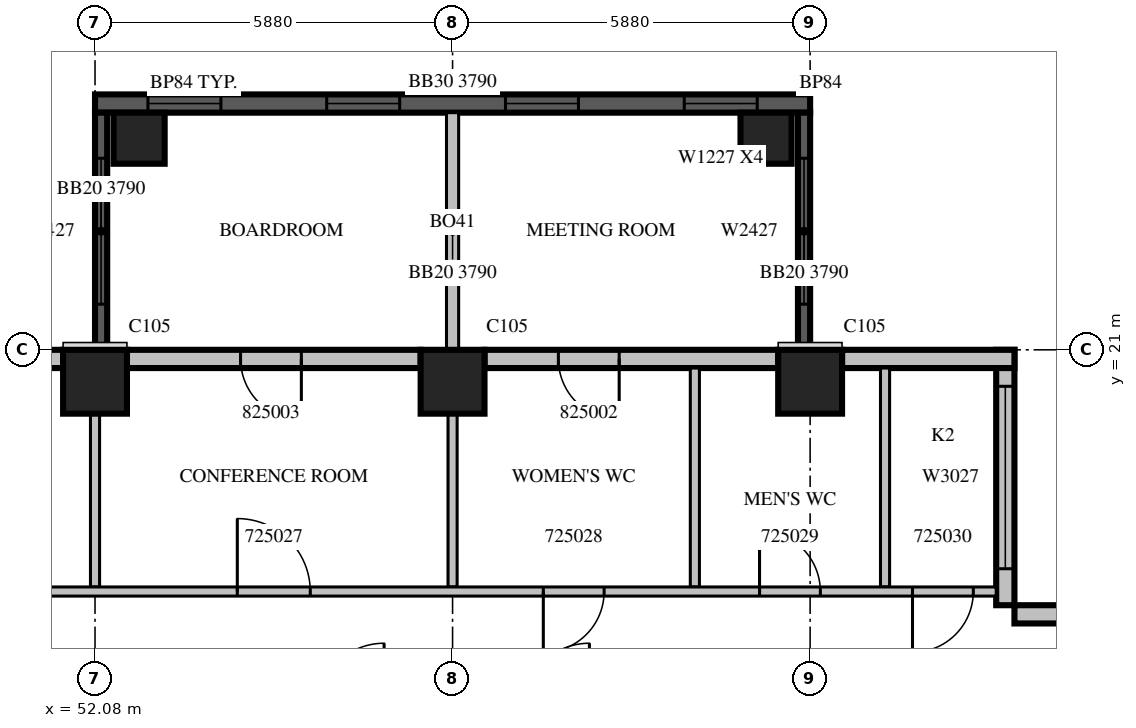
"""IFC4 building model, lengths in metres.
Left out: names, types, materials, properties, quantities, classifications, styles, units other than length and angle.
Written with IfcOpenShell. Run it as: python <this file> out.ifc"""

import sys

from ifc_helpers import new_model, si_unit, direction, frame, frame_2d, origin, origin_2d, place, context, subcontext, project, spatial, rectangle, extrude, source, transform, mapped, element, fill, save


model = new_model("IFC4")
c1 = context("Model", 3, precision=1e-05, world=origin(), true_north=direction((0.0, 1.0)))
c2 = subcontext(c1, "Body", "Model", "MODEL_VIEW")
j1 = project(units=[si_unit("LENGTHUNIT", "METRE"), si_unit("PLANEANGLEUNIT", "RADIAN")], contexts=[c1])
p1 = place(None, origin())
s1 = spatial("IfcSite", under=j1, at=p1, CompositionType="ELEMENT")
p2 = place(p1, origin())
s2 = spatial("IfcBuilding", under=s1, at=p2, CompositionType="ELEMENT")
p3 = place(p2, frame((0.0, 0.0, 116.1)))
s3 = spatial("IfcBuildingStorey", under=s2, at=p3, CompositionType="ELEMENT", Elevation=116.1)
m1 = source(origin(), c2, "Body", "SweptSolid", [
    extrude(rectangle(XDim=1.05, YDim=1.05, at=origin_2d()), origin(), (0.0, 0.0, 1.0), 4.2),
])
for number, where, z_axis, x_axis in (
    (1, (52.08, 20.475, 0.0), (0.0, 0.0, 1.0), (1.0, 0.0, 0.0)),
    (2, (57.96, 20.475, 0.0), (0.0, 0.0, 1.0), (1.0, 0.0, 0.0)),
    (3, (63.84, 20.475, 0.0), (0.0, 0.0, 1.0), (1.0, 0.0, 0.0)),
):
    element("IfcColumn", number, at=place(p3, frame(where, z_axis=z_axis, x_axis=x_axis)), inside=s3, PredefinedType="COLUMN", context=c2, shape_type="MappedRepresentation", body=[
        mapped(m1, transform((0.0, 0.0, 0.0), scale=1.0)),
    ])
m2 = source(origin(), c2, "Body", "SweptSolid", [
    extrude(rectangle(XDim=0.84, YDim=0.84, at=origin_2d()), origin(), (0.0, 0.0, 1.0), 4.2),
])
for number, where, z_axis, x_axis in (
    (4, (52.805, 24.48, 0.0), (0.0, 0.0, 1.0), (1.0, 0.0, 0.0)),
    (5, (63.115, 24.48, 0.0), (0.0, 0.0, 1.0), (1.0, 0.0, 0.0)),
):
    element("IfcColumn", number, at=place(p3, frame(where, z_axis=z_axis, x_axis=x_axis)), inside=s3, PredefinedType="COLUMN", context=c2, shape_type="MappedRepresentation", body=[
        mapped(m2, transform((0.0, 0.0, 0.0), scale=1.0)),
    ])
m3 = source(origin(), c2, "Body", "SweptSolid", [
    extrude(rectangle(XDim=11.76, YDim=0.3, at=frame_2d((5.88, 0.0))), origin(), (0.0, 0.0, 1.0), 3.79),
])
p4 = place(p3, frame((63.84, 25.05, 0.0), z_axis=(0.0, 0.0, 1.0), x_axis=(-1.0, 0.0, 0.0)))
e6 = element("IfcWall", 6, at=p4, inside=s3, PredefinedType="SOLIDWALL", context=c2, shape_type="MappedRepresentation", body=[
    mapped(m3, transform((0.0, 0.0, 0.0), scale=1.0)),
])
m4 = source(origin(), c2, "Body", "SweptSolid", [
    extrude(rectangle(XDim=1.2, YDim=2.7, at=frame_2d((0.6, 1.35))), frame((0.0, 0.16, 0.0), z_axis=(0.0, -1.0, 0.0), x_axis=(1.0, 0.0, 0.0)), (0.0, 0.0, 1.0), 0.32),
])
p5 = place(p4, frame((0.87, 0.0, 0.6)))
e7 = element("IfcOpeningElement", 7, at=p5, cuts=e6, PredefinedType="OPENING", context=c2, shape_type="MappedRepresentation", body=[
    mapped(m4, transform((0.0, 0.0, 0.0), scale=1.0)),
])
p6 = place(p4, frame((3.81, 0.0, 0.6)))
e8 = element("IfcOpeningElement", 8, at=p6, cuts=e6, PredefinedType="OPENING", context=c2, shape_type="MappedRepresentation", body=[
    mapped(m4, transform((0.0, 0.0, 0.0), scale=1.0)),
])
p7 = place(p4, frame((6.75, 0.0, 0.6)))
e9 = element("IfcOpeningElement", 9, at=p7, cuts=e6, PredefinedType="OPENING", context=c2, shape_type="MappedRepresentation", body=[
    mapped(m4, transform((0.0, 0.0, 0.0), scale=1.0)),
])
p8 = place(p4, frame((9.69, 0.0, 0.6)))
e10 = element("IfcOpeningElement", 10, at=p8, cuts=e6, PredefinedType="OPENING", context=c2, shape_type="MappedRepresentation", body=[
    mapped(m4, transform((0.0, 0.0, 0.0), scale=1.0)),
])
m5 = source(origin(), c2, "Body", "SweptSolid", [
    extrude(rectangle(XDim=3.9, YDim=0.2, at=frame_2d((1.95, 0.0))), origin(), (0.0, 0.0, 1.0), 3.79),
])
p9 = place(p3, frame((57.96, 21.0, 0.0), z_axis=(0.0, 0.0, 1.0), x_axis=(0.0, 1.0, 0.0)))
e11 = element("IfcWall", 11, at=p9, inside=s3, PredefinedType="SOLIDWALL", context=c2, shape_type="MappedRepresentation", body=[
    mapped(m5, transform((0.0, 0.0, 0.0), scale=1.0)),
])
m6 = source(origin(), c2, "Body", "SweptSolid", [
    extrude(rectangle(XDim=3.9, YDim=0.2, at=frame_2d((1.95, 0.0))), origin(), (0.0, 0.0, 1.0), 3.79),
])
p10 = place(p3, frame((63.74, 21.0, 0.0), z_axis=(0.0, 0.0, 1.0), x_axis=(0.0, 1.0, 0.0)))
e12 = element("IfcWall", 12, at=p10, inside=s3, PredefinedType="SOLIDWALL", context=c2, shape_type="MappedRepresentation", body=[
    mapped(m6, transform((0.0, 0.0, 0.0), scale=1.0)),
])
m7 = source(origin(), c2, "Body", "SweptSolid", [
    extrude(rectangle(XDim=2.4, YDim=2.7, at=frame_2d((1.2, 1.35))), frame((0.0, 0.11, 0.0), z_axis=(0.0, -1.0, 0.0), x_axis=(1.0, 0.0, 0.0)), (0.0, 0.0, 1.0), 0.22),
])
p11 = place(p10, frame((0.75, 0.0, 0.6)))
e13 = element("IfcOpeningElement", 13, at=p11, cuts=e12, PredefinedType="OPENING", context=c2, shape_type="MappedRepresentation", body=[
    mapped(m7, transform((0.0, 0.0, 0.0), scale=1.0)),
])
p12 = place(p3, frame((52.18, 21.0, 0.0), z_axis=(0.0, 0.0, 1.0), x_axis=(0.0, 1.0, 0.0)))
e14 = element("IfcWall", 14, at=p12, inside=s3, PredefinedType="SOLIDWALL", context=c2, shape_type="MappedRepresentation", body=[
    mapped(m6, transform((0.0, 0.0, 0.0), scale=1.0)),
])
p13 = place(p12, frame((0.75, 0.0, 0.6)))
e15 = element("IfcOpeningElement", 15, at=p13, cuts=e14, PredefinedType="OPENING", context=c2, shape_type="MappedRepresentation", body=[
    mapped(m7, transform((0.0, 0.0, 0.0), scale=1.0)),
])
m8 = source(origin(), c2, "Body", "SweptSolid", [
    extrude(rectangle(XDim=4.2, YDim=0.3, at=frame_2d((2.1, 0.0))), origin(), (0.0, 0.0, 1.0), 3.8),
])
p14 = place(p3, frame((71.4, 16.65, 0.0), z_axis=(0.0, 0.0, 1.0), x_axis=(-1.0, 0.0, 0.0)))
e16 = element("IfcWall", 16, at=p14, inside=s3, PredefinedType="STANDARD", context=c2, shape_type="MappedRepresentation", body=[
    mapped(m8, transform((0.0, 0.0, 0.0), scale=1.0)),
])
p15 = place(p14, frame((0.66, 0.0, 0.6)))
e17 = element("IfcOpeningElement", 17, at=p15, cuts=e16, PredefinedType="OPENING", context=c2, shape_type="MappedRepresentation", body=[
    mapped(m4, transform((0.0, 0.0, 0.0), scale=1.0)),
])
p16 = place(p3, frame((67.05, 16.8, 0.0), z_axis=(0.0, 0.0, 1.0), x_axis=(0.0, 1.0, 0.0)))
e18 = element("IfcWall", 18, at=p16, inside=s3, PredefinedType="STANDARD", context=c2, shape_type="MappedRepresentation", body=[
    mapped(m8, transform((0.0, 0.0, 0.0), scale=1.0)),
])
m9 = source(origin(), c2, "Body", "SweptSolid", [
    extrude(rectangle(XDim=3.0, YDim=2.7, at=frame_2d((1.5, 1.35))), frame((0.0, 0.16, 0.0), z_axis=(0.0, -1.0, 0.0), x_axis=(1.0, 0.0, 0.0)), (0.0, 0.0, 1.0), 0.32),
])
p17 = place(p16, frame((0.6, 0.0, 0.6)))
e19 = element("IfcOpeningElement", 19, at=p17, cuts=e18, PredefinedType="OPENING", context=c2, shape_type="MappedRepresentation", body=[
    mapped(m9, transform((0.0, 0.0, 0.0), scale=1.0)),
])
m10 = source(origin(), c2, "Body", "SweptSolid", [
    extrude(rectangle(XDim=2.835, YDim=0.3, at=frame_2d((1.417, 0.0))), origin(), (0.0, 0.0, 1.0), 3.8),
])
p18 = place(p3, frame((67.2, 20.85, 0.0), z_axis=(0.0, 0.0, 1.0), x_axis=(-1.0, 0.0, 0.0)))
e20 = element("IfcWall", 20, at=p18, inside=s3, PredefinedType="STANDARD", context=c2, shape_type="MappedRepresentation", body=[
    mapped(m10, transform((0.0, 0.0, 0.0), scale=1.0)),
])
m11 = source(origin(), c2, "Body", "SweptSolid", [
    extrude(rectangle(XDim=4.83, YDim=0.3, at=frame_2d((2.415, 0.0))), origin(), (0.0, 0.0, 1.0), 3.8),
])
p19 = place(p3, frame((63.315, 20.85, 0.0), z_axis=(0.0, 0.0, 1.0), x_axis=(-1.0, 0.0, 0.0)))
e21 = element("IfcWall", 21, at=p19, inside=s3, PredefinedType="STANDARD", context=c2, shape_type="MappedRepresentation", body=[
    mapped(m11, transform((0.0, 0.0, 0.0), scale=1.0)),
])
m12 = source(origin(), c2, "Body", "SweptSolid", [
    extrude(rectangle(XDim=1.0, YDim=2.1, at=frame_2d((0.5, 1.05))), frame((0.0, 0.16, 0.0), z_axis=(0.0, -1.0, 0.0), x_axis=(1.0, 0.0, 0.0)), (0.0, 0.0, 1.0), 0.32),
])
p20 = place(p19, frame((2.615, 0.0, 0.0)))
e22 = element("IfcOpeningElement", 22, at=p20, cuts=e21, PredefinedType="OPENING", context=c2, shape_type="MappedRepresentation", body=[
    mapped(m12, transform((0.0, 0.0, 0.0), scale=1.0)),
])
p21 = place(p3, frame((57.435, 20.85, 0.0), z_axis=(0.0, 0.0, 1.0), x_axis=(-1.0, 0.0, 0.0)))
e23 = element("IfcWall", 23, at=p21, inside=s3, PredefinedType="STANDARD", context=c2, shape_type="MappedRepresentation", body=[
    mapped(m11, transform((0.0, 0.0, 0.0), scale=1.0)),
])
p22 = place(p21, frame((1.962, 0.0, 0.0)))
e24 = element("IfcOpeningElement", 24, at=p22, cuts=e23, PredefinedType="OPENING", context=c2, shape_type="MappedRepresentation", body=[
    mapped(m12, transform((0.0, 0.0, 0.0), scale=1.0)),
])
p23 = place(p3, frame((51.555, 20.85, 0.0), z_axis=(0.0, 0.0, 1.0), x_axis=(-1.0, 0.0, 0.0)))
e25 = element("IfcWall", 25, at=p23, inside=s3, PredefinedType="STANDARD", context=c2, shape_type="SweptSolid", body=[
    extrude(rectangle(XDim=1.155, YDim=0.3, at=frame_2d((0.578, 0.0))), origin(), (0.0, 0.0, 1.0), 3.8),
])
m13 = source(origin(), c2, "Body", "SweptSolid", [
    extrude(rectangle(XDim=2.851, YDim=0.15, at=frame_2d((1.425, 0.0))), origin(), (0.0, 0.0, 1.0), 3.8),
])
p24 = place(p3, frame((52.08, 19.951, 0.0), z_axis=(0.0, 0.0, 1.0), x_axis=(0.0, -1.0, 0.0)))
e26 = element("IfcWall", 26, at=p24, inside=s3, PredefinedType="PARTITIONING", context=c2, shape_type="MappedRepresentation", body=[
    mapped(m13, transform((0.0, 0.0, 0.0), scale=1.0)),
])
m14 = source(origin(), c2, "Body", "SweptSolid", [
    extrude(rectangle(XDim=3.6, YDim=0.15, at=frame_2d((1.8, 0.0))), origin(), (0.0, 0.0, 1.0), 3.8),
])
for number, where, z_axis, x_axis in (
    (27, (61.944, 20.7, 0.0), (0.0, 0.0, 1.0), (0.0, -1.0, 0.0)),
    (28, (65.072, 20.7, 0.0), (0.0, 0.0, 1.0), (0.0, -1.0, 0.0)),
):
    element("IfcWall", number, at=place(p3, frame(where, z_axis=z_axis, x_axis=x_axis)), inside=s3, PredefinedType="PARTITIONING", context=c2, shape_type="MappedRepresentation", body=[
        mapped(m14, transform((0.0, 0.0, 0.0), scale=1.0)),
    ])
p25 = place(p3, frame((57.96, 17.1, 0.0), z_axis=(0.0, 0.0, 1.0), x_axis=(0.0, 1.0, 0.0)))
e29 = element("IfcWall", 29, at=p25, inside=s3, PredefinedType="PARTITIONING", context=c2, shape_type="MappedRepresentation", body=[
    mapped(m13, transform((0.0, 0.0, 0.0), scale=1.0)),
])
m15 = source(origin(), c2, "Body", "SweptSolid", [
    extrude(rectangle(XDim=37.5, YDim=0.15, at=frame_2d((18.75, 0.0))), origin(), (0.0, 0.0, 1.0), 3.3),
])
p26 = place(p3, frame((29.4, 17.025, 0.0), z_axis=(0.0, 0.0, 1.0), x_axis=(1.0, 0.0, 0.0)))
e30 = element("IfcWall", 30, at=p26, inside=s3, PredefinedType="PARTITIONING", context=c2, shape_type="MappedRepresentation", body=[
    mapped(m15, transform((0.0, 0.0, 0.0), scale=1.0)),
])
m16 = source(origin(), c2, "Body", "SweptSolid", [
    extrude(rectangle(XDim=1.0, YDim=2.1, at=frame_2d((0.5, 1.05))), frame((0.0, 0.085, 0.0), z_axis=(0.0, -1.0, 0.0), x_axis=(1.0, 0.0, 0.0)), (0.0, 0.0, 1.0), 0.17),
])
p27 = place(p26, frame((1.357, 0.0, 0.0)))
e31 = element("IfcOpeningElement", 31, at=p27, cuts=e30, PredefinedType="OPENING", context=c2, shape_type="MappedRepresentation", body=[
    mapped(m16, transform((0.0, 0.0, 0.0), scale=1.0)),
])
p28 = place(p26, frame((4.669, 0.0, 0.0)))
e32 = element("IfcOpeningElement", 32, at=p28, cuts=e30, PredefinedType="OPENING", context=c2, shape_type="MappedRepresentation", body=[
    mapped(m16, transform((0.0, 0.0, 0.0), scale=1.0)),
])
p29 = place(p26, frame((7.012, 0.0, 0.0)))
e33 = element("IfcOpeningElement", 33, at=p29, cuts=e30, PredefinedType="OPENING", context=c2, shape_type="MappedRepresentation", body=[
    mapped(m16, transform((0.0, 0.0, 0.0), scale=1.0)),
])
m17 = source(origin(), c2, "Body", "SweptSolid", [
    extrude(rectangle(XDim=0.9, YDim=2.1, at=frame_2d((0.45, 1.05))), frame((0.0, 0.085, 0.0), z_axis=(0.0, -1.0, 0.0), x_axis=(1.0, 0.0, 0.0)), (0.0, 0.0, 1.0), 0.17),
])
p30 = place(p26, frame((10.05, 0.0, 0.0)))
e34 = element("IfcOpeningElement", 34, at=p30, cuts=e30, PredefinedType="OPENING", context=c2, shape_type="MappedRepresentation", body=[
    mapped(m17, transform((0.0, 0.0, 0.0), scale=1.0)),
])
p31 = place(p26, frame((13.474, 0.0, 0.0)))
e35 = element("IfcOpeningElement", 35, at=p31, cuts=e30, PredefinedType="OPENING", context=c2, shape_type="MappedRepresentation", body=[
    mapped(m16, transform((0.0, 0.0, 0.0), scale=1.0)),
])
p32 = place(p26, frame((15.624, 0.0, 0.0)))
e36 = element("IfcOpeningElement", 36, at=p32, cuts=e30, PredefinedType="OPENING", context=c2, shape_type="MappedRepresentation", body=[
    mapped(m17, transform((0.0, 0.0, 0.0), scale=1.0)),
])
m18 = source(origin(), c2, "Body", "SweptSolid", [
    extrude(rectangle(XDim=1.2, YDim=2.1, at=frame_2d((0.6, 1.05))), frame((0.0, 0.085, 0.0), z_axis=(0.0, -1.0, 0.0), x_axis=(1.0, 0.0, 0.0)), (0.0, 0.0, 1.0), 0.17),
])
p33 = place(p26, frame((19.14, 0.0, 0.0)))
e37 = element("IfcOpeningElement", 37, at=p33, cuts=e30, PredefinedType="OPENING", context=c2, shape_type="MappedRepresentation", body=[
    mapped(m18, transform((0.0, 0.0, 0.0), scale=1.0)),
])
p34 = place(p26, frame((25.02, 0.0, 0.0)))
e38 = element("IfcOpeningElement", 38, at=p34, cuts=e30, PredefinedType="OPENING", context=c2, shape_type="MappedRepresentation", body=[
    mapped(m18, transform((0.0, 0.0, 0.0), scale=1.0)),
])
p35 = place(p26, frame((30.052, 0.0, 0.0)))
e39 = element("IfcOpeningElement", 39, at=p35, cuts=e30, PredefinedType="OPENING", context=c2, shape_type="MappedRepresentation", body=[
    mapped(m16, transform((0.0, 0.0, 0.0), scale=1.0)),
])
p36 = place(p26, frame((33.608, 0.0, 0.0)))
e40 = element("IfcOpeningElement", 40, at=p36, cuts=e30, PredefinedType="OPENING", context=c2, shape_type="MappedRepresentation", body=[
    mapped(m16, transform((0.0, 0.0, 0.0), scale=1.0)),
])
p37 = place(p26, frame((36.124, 0.0, 0.0)))
e41 = element("IfcOpeningElement", 41, at=p37, cuts=e30, PredefinedType="OPENING", context=c2, shape_type="MappedRepresentation", body=[
    mapped(m16, transform((0.0, 0.0, 0.0), scale=1.0)),
])
m19 = source(origin(), c2, "Body", "SweptSolid", [
    extrude(rectangle(XDim=1.2, YDim=2.7, at=frame_2d((0.6, 1.35))), frame((0.0, 0.03, 0.0), z_axis=(0.0, -1.0, 0.0), x_axis=(1.0, 0.0, 0.0)), (0.0, 0.0, 1.0), 0.06),
])
p38 = place(p5, origin())
e42 = element("IfcWindow", 42, at=p38, inside=s3, PartitioningType="SINGLE_PANEL", PredefinedType="WINDOW", context=c2, shape_type="MappedRepresentation", body=[
    mapped(m19, transform((0.0, 0.0, 0.0), scale=1.0)),
])
fill(e7, e42)
p39 = place(p6, origin())
e43 = element("IfcWindow", 43, at=p39, inside=s3, PartitioningType="SINGLE_PANEL", PredefinedType="WINDOW", context=c2, shape_type="MappedRepresentation", body=[
    mapped(m19, transform((0.0, 0.0, 0.0), scale=1.0)),
])
fill(e8, e43)
p40 = place(p7, origin())
e44 = element("IfcWindow", 44, at=p40, inside=s3, PartitioningType="SINGLE_PANEL", PredefinedType="WINDOW", context=c2, shape_type="MappedRepresentation", body=[
    mapped(m19, transform((0.0, 0.0, 0.0), scale=1.0)),
])
fill(e9, e44)
p41 = place(p8, origin())
e45 = element("IfcWindow", 45, at=p41, inside=s3, PartitioningType="SINGLE_PANEL", PredefinedType="WINDOW", context=c2, shape_type="MappedRepresentation", body=[
    mapped(m19, transform((0.0, 0.0, 0.0), scale=1.0)),
])
fill(e10, e45)
m20 = source(origin(), c2, "Body", "SweptSolid", [
    extrude(rectangle(XDim=2.4, YDim=2.7, at=frame_2d((1.2, 1.35))), frame((0.0, 0.03, 0.0), z_axis=(0.0, -1.0, 0.0), x_axis=(1.0, 0.0, 0.0)), (0.0, 0.0, 1.0), 0.06),
])
p42 = place(p11, origin())
e46 = element("IfcWindow", 46, at=p42, inside=s3, PartitioningType="SINGLE_PANEL", PredefinedType="WINDOW", context=c2, shape_type="MappedRepresentation", body=[
    mapped(m20, transform((0.0, 0.0, 0.0), scale=1.0)),
])
fill(e13, e46)
p43 = place(p13, origin())
e47 = element("IfcWindow", 47, at=p43, inside=s3, PartitioningType="SINGLE_PANEL", PredefinedType="WINDOW", context=c2, shape_type="MappedRepresentation", body=[
    mapped(m20, transform((0.0, 0.0, 0.0), scale=1.0)),
])
fill(e15, e47)
m21 = source(origin(), c2, "Body", "SweptSolid", [
    extrude(rectangle(XDim=3.0, YDim=2.7, at=frame_2d((1.5, 1.35))), frame((0.0, 0.03, 0.0), z_axis=(0.0, -1.0, 0.0), x_axis=(1.0, 0.0, 0.0)), (0.0, 0.0, 1.0), 0.06),
])
p44 = place(p17, origin())
e48 = element("IfcWindow", 48, at=p44, inside=s3, PartitioningType="SINGLE_PANEL", PredefinedType="WINDOW", context=c2, shape_type="MappedRepresentation", body=[
    mapped(m21, transform((0.0, 0.0, 0.0), scale=1.0)),
])
fill(e19, e48)
m22 = source(origin(), c2, "Body", "SweptSolid", [
    extrude(rectangle(XDim=1.2, YDim=2.1, at=frame_2d((0.6, 1.05))), frame((0.0, 0.025, 0.0), z_axis=(0.0, -1.0, 0.0), x_axis=(1.0, 0.0, 0.0)), (0.0, 0.0, 1.0), 0.05),
])
p45 = place(p34, origin())
e49 = element("IfcDoor", 49, at=p45, inside=s3, OperationType="SINGLE_SWING_LEFT", PredefinedType="DOOR", context=c2, shape_type="MappedRepresentation", body=[
    mapped(m22, transform((0.0, 0.0, 0.0), scale=1.0)),
])
fill(e38, e49)
m23 = source(origin(), c2, "Body", "SweptSolid", [
    extrude(rectangle(XDim=1.0, YDim=2.1, at=frame_2d((0.5, 1.05))), frame((0.0, 0.025, 0.0), z_axis=(0.0, -1.0, 0.0), x_axis=(1.0, 0.0, 0.0)), (0.0, 0.0, 1.0), 0.05),
])
p46 = place(p35, origin())
e50 = element("IfcDoor", 50, at=p46, inside=s3, OperationType="SINGLE_SWING_RIGHT", PredefinedType="DOOR", context=c2, shape_type="MappedRepresentation", body=[
    mapped(m23, transform((0.0, 0.0, 0.0), scale=1.0)),
])
fill(e39, e50)
p47 = place(p36, origin())
e51 = element("IfcDoor", 51, at=p47, inside=s3, OperationType="SINGLE_SWING_LEFT", PredefinedType="DOOR", context=c2, shape_type="MappedRepresentation", body=[
    mapped(m23, transform((0.0, 0.0, 0.0), scale=1.0)),
])
fill(e40, e51)
p48 = place(p37, origin())
e52 = element("IfcDoor", 52, at=p48, inside=s3, OperationType="SINGLE_SWING_RIGHT", PredefinedType="DOOR", context=c2, shape_type="MappedRepresentation", body=[
    mapped(m23, transform((0.0, 0.0, 0.0), scale=1.0)),
])
fill(e41, e52)
p49 = place(p20, origin())
e53 = element("IfcDoor", 53, at=p49, inside=s3, OperationType="SINGLE_SWING_LEFT", PredefinedType="DOOR", context=c2, shape_type="MappedRepresentation", body=[
    mapped(m23, transform((0.0, 0.0, 0.0), scale=1.0)),
])
fill(e22, e53)
p50 = place(p22, origin())
e54 = element("IfcDoor", 54, at=p50, inside=s3, OperationType="SINGLE_SWING_LEFT", PredefinedType="DOOR", context=c2, shape_type="MappedRepresentation", body=[
    mapped(m23, transform((0.0, 0.0, 0.0), scale=1.0)),
])
fill(e24, e54)
save(model, sys.argv[1])
